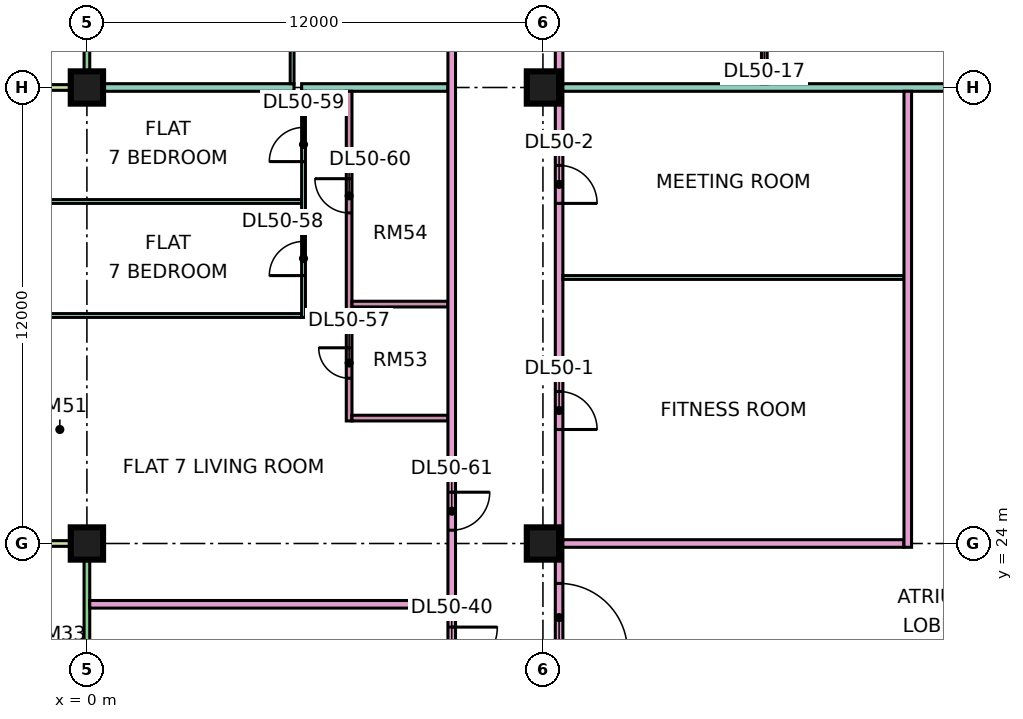
"""IFC4 building model, lengths in metres.
Left out: names, types, materials, properties, quantities, classifications, styles, units other than length and angle.
Written with IfcOpenShell. Run it as: python <this file> out.ifc"""

import sys

from ifc_helpers import new_model, si_unit, direction, frame, frame_2d, origin, origin_2d, place, context, subcontext, project, spatial, rectangle, extrude, element, fill, save


model = new_model("IFC4")
c1 = context("Model", 3, precision=1e-05, world=origin(), true_north=direction((0.0, 1.0)))
c2 = subcontext(c1, "Body", "Model", "MODEL_VIEW")
j1 = project(units=[si_unit("LENGTHUNIT", "METRE"), si_unit("PLANEANGLEUNIT", "RADIAN")], contexts=[c1])
p1 = place(None, origin())
s1 = spatial("IfcSite", under=j1, at=p1, CompositionType="ELEMENT")
p2 = place(p1, origin())
s2 = spatial("IfcBuilding", under=s1, at=p2, CompositionType="ELEMENT")
p3 = place(p2, frame((0.0, 0.0, 215.4)))
s3 = spatial("IfcBuildingStorey", under=s2, at=p3, CompositionType="ELEMENT", Elevation=215.4)
p4 = place(p3, frame((0.0, 24.0, 0.0), z_axis=(0.0, 0.0, 1.0), x_axis=(1.0, 0.0, 0.0)))
e1 = element("IfcColumn", 1, at=p4, inside=s3, PredefinedType="COLUMN", context=c2, shape_type="SweptSolid", body=[
    extrude(rectangle(XDim=0.85, YDim=0.85, at=origin_2d()), origin(), (0.0, 0.0, 1.0), 3.75),
])
p5 = place(p3, frame((0.0, 36.0, 0.0), z_axis=(0.0, 0.0, 1.0), x_axis=(1.0, 0.0, 0.0)))
e2 = element("IfcColumn", 2, at=p5, inside=s3, PredefinedType="COLUMN", context=c2, shape_type="SweptSolid", body=[
    extrude(rectangle(XDim=0.85, YDim=0.85, at=origin_2d()), origin(), (0.0, 0.0, 1.0), 3.75),
])
for number, where, z_axis, x_axis in (
    (3, (12.0, 24.0, 0.0), (0.0, 0.0, 1.0), (1.0, 0.0, 0.0)),
    (4, (12.0, 36.0, 0.0), (0.0, 0.0, 1.0), (1.0, 0.0, 0.0)),
):
    element("IfcColumn", number, at=place(p3, frame(where, z_axis=z_axis, x_axis=x_axis)), inside=s3, PredefinedType="COLUMN", context=c2, shape_type="SweptSolid", body=[
        extrude(rectangle(XDim=0.85, YDim=0.85, at=origin_2d()), origin(), (0.0, 0.0, 1.0), 3.75),
    ])
p6 = place(p3, frame((0.0, 47.925, 0.0), z_axis=(0.0, 0.0, 1.0), x_axis=(0.0, -1.0, 0.0)))
e5 = element("IfcWall", 5, at=p6, inside=s3, PredefinedType="SOLIDWALL", context=c2, shape_type="SweptSolid", body=[
    extrude(rectangle(XDim=11.85, YDim=0.15, at=frame_2d((5.925, 0.0))), origin(), (0.0, 0.0, 1.0), 3.35),
])
p7 = place(p6, frame((0.6, 0.0, 0.45)))
e6 = element("IfcOpeningElement", 6, at=p7, cuts=e5, PredefinedType="OPENING", context=c2, shape_type="SweptSolid", body=[
    extrude(rectangle(XDim=1.2, YDim=2.4, at=frame_2d((0.6, 1.2))), frame((0.0, 0.085, 0.0), z_axis=(0.0, -1.0, 0.0), x_axis=(1.0, 0.0, 0.0)), (0.0, 0.0, 1.0), 0.17),
])
p8 = place(p6, frame((4.087, 0.0, 0.0)))
e7 = element("IfcOpeningElement", 7, at=p8, cuts=e5, PredefinedType="OPENING", context=c2, shape_type="SweptSolid", body=[
    extrude(rectangle(XDim=1.2, YDim=2.4, at=frame_2d((0.6, 1.2))), frame((0.0, 0.085, 0.0), z_axis=(0.0, -1.0, 0.0), x_axis=(1.0, 0.0, 0.0)), (0.0, 0.0, 1.0), 0.17),
])
p9 = place(p6, frame((6.525, 0.0, 0.45)))
e8 = element("IfcOpeningElement", 8, at=p9, cuts=e5, PredefinedType="OPENING", context=c2, shape_type="SweptSolid", body=[
    extrude(rectangle(XDim=1.8, YDim=2.4, at=frame_2d((0.9, 1.2))), frame((0.0, 0.085, 0.0), z_axis=(0.0, -1.0, 0.0), x_axis=(1.0, 0.0, 0.0)), (0.0, 0.0, 1.0), 0.17),
])
p10 = place(p6, frame((9.562, 0.0, 0.45)))
e9 = element("IfcOpeningElement", 9, at=p10, cuts=e5, PredefinedType="OPENING", context=c2, shape_type="SweptSolid", body=[
    extrude(rectangle(XDim=1.2, YDim=2.4, at=frame_2d((0.6, 1.2))), frame((0.0, 0.085, 0.0), z_axis=(0.0, -1.0, 0.0), x_axis=(1.0, 0.0, 0.0)), (0.0, 0.0, 1.0), 0.17),
])
p11 = place(p3, frame((-1.5, 36.0, 0.0), z_axis=(0.0, 0.0, 1.0), x_axis=(1.0, 0.0, 0.0)))
e10 = element("IfcWall", 10, at=p11, inside=s3, PredefinedType="SOLIDWALL", context=c2, shape_type="SweptSolid", body=[
    extrude(rectangle(XDim=1.5, YDim=0.15, at=frame_2d((0.75, 0.0))), origin(), (0.0, 0.0, 1.0), 3.35),
])
p12 = place(p3, frame((0.0, 23.925, 0.0), z_axis=(0.0, 0.0, 1.0), x_axis=(0.0, -1.0, 0.0)))
e11 = element("IfcWall", 11, at=p12, inside=s3, PredefinedType="SOLIDWALL", context=c2, shape_type="SweptSolid", body=[
    extrude(rectangle(XDim=11.35, YDim=0.15, at=frame_2d((5.675, 0.0))), origin(), (0.0, 0.0, 1.0), 3.35),
])
p13 = place(p12, frame((6.738, 0.0, 0.0)))
e12 = element("IfcOpeningElement", 12, at=p13, cuts=e11, PredefinedType="OPENING", context=c2, shape_type="SweptSolid", body=[
    extrude(rectangle(XDim=1.8, YDim=2.4, at=frame_2d((0.9, 1.2))), frame((0.0, 0.085, 0.0), z_axis=(0.0, -1.0, 0.0), x_axis=(1.0, 0.0, 0.0)), (0.0, 0.0, 1.0), 0.17),
])
p14 = place(p3, frame((-1.5, 24.0, 0.0), z_axis=(0.0, 0.0, 1.0), x_axis=(1.0, 0.0, 0.0)))
e13 = element("IfcWall", 13, at=p14, inside=s3, PredefinedType="SOLIDWALL", context=c2, shape_type="SweptSolid", body=[
    extrude(rectangle(XDim=1.5, YDim=0.15, at=frame_2d((0.75, 0.0))), origin(), (0.0, 0.0, 1.0), 3.35),
])
p15 = place(p3, frame((-1.351, 33.0, 0.0), z_axis=(0.0, 0.0, 1.0), x_axis=(1.0, 0.0, 0.0)))
e14 = element("IfcWall", 14, at=p15, inside=s3, PredefinedType="PARTITIONING", context=c2, shape_type="SweptSolid", body=[
    extrude(rectangle(XDim=7.001, YDim=0.1, at=frame_2d((3.5, 0.0))), origin(), (0.0, 0.0, 1.0), 3.35),
])
p16 = place(p3, frame((-1.35, 30.0, 0.0), z_axis=(0.0, 0.0, 1.0), x_axis=(1.0, 0.0, 0.0)))
e15 = element("IfcWall", 15, at=p16, inside=s3, PredefinedType="PARTITIONING", context=c2, shape_type="SweptSolid", body=[
    extrude(rectangle(XDim=7.0, YDim=0.1, at=frame_2d((3.5, 0.0))), origin(), (0.0, 0.0, 1.0), 3.35),
])
e16 = element("IfcWall", 16, at=p5, inside=s3, PredefinedType="PARTITIONING", context=c2, shape_type="SweptSolid", body=[
    extrude(rectangle(XDim=5.45, YDim=0.2, at=frame_2d((2.725, 0.0))), origin(), (0.0, 0.0, 1.0), 3.35),
])
p17 = place(p3, frame((0.074, 22.4, 0.0), z_axis=(0.0, 0.0, 1.0), x_axis=(1.0, 0.0, 0.0)))
e17 = element("IfcWall", 17, at=p17, inside=s3, PredefinedType="PARTITIONING", context=c2, shape_type="SweptSolid", body=[
    extrude(rectangle(XDim=9.426, YDim=0.2, at=frame_2d((4.713, 0.0))), origin(), (0.0, 0.0, 1.0), 3.35),
])
p18 = place(p3, frame((5.4, 36.1, 0.0), z_axis=(0.0, 0.0, 1.0), x_axis=(0.0, 1.0, 0.0)))
e18 = element("IfcWall", 18, at=p18, inside=s3, PredefinedType="PARTITIONING", context=c2, shape_type="SweptSolid", body=[
    extrude(rectangle(XDim=26.95, YDim=0.1, at=frame_2d((13.475, 0.0))), origin(), (0.0, 0.0, 1.0), 3.35),
])
p19 = place(p18, frame((0.95, 0.0, 0.0)))
e19 = element("IfcOpeningElement", 19, at=p19, cuts=e18, PredefinedType="OPENING", context=c2, shape_type="SweptSolid", body=[
    extrude(rectangle(XDim=0.9, YDim=2.1, at=frame_2d((0.45, 1.05))), frame((0.0, 0.06, 0.0), z_axis=(0.0, -1.0, 0.0), x_axis=(1.0, 0.0, 0.0)), (0.0, 0.0, 1.0), 0.12),
])
p20 = place(p18, frame((3.95, 0.0, 0.0)))
e20 = element("IfcOpeningElement", 20, at=p20, cuts=e18, PredefinedType="OPENING", context=c2, shape_type="SweptSolid", body=[
    extrude(rectangle(XDim=0.9, YDim=2.1, at=frame_2d((0.45, 1.05))), frame((0.0, 0.06, 0.0), z_axis=(0.0, -1.0, 0.0), x_axis=(1.0, 0.0, 0.0)), (0.0, 0.0, 1.0), 0.12),
])
p21 = place(p18, frame((15.95, 0.0, 0.0)))
e21 = element("IfcOpeningElement", 21, at=p21, cuts=e18, PredefinedType="OPENING", context=c2, shape_type="SweptSolid", body=[
    extrude(rectangle(XDim=0.9, YDim=2.1, at=frame_2d((0.45, 1.05))), frame((0.0, 0.06, 0.0), z_axis=(0.0, -1.0, 0.0), x_axis=(1.0, 0.0, 0.0)), (0.0, 0.0, 1.0), 0.12),
])
p22 = place(p18, frame((18.95, 0.0, 0.0)))
e22 = element("IfcOpeningElement", 22, at=p22, cuts=e18, PredefinedType="OPENING", context=c2, shape_type="SweptSolid", body=[
    extrude(rectangle(XDim=0.9, YDim=2.1, at=frame_2d((0.45, 1.05))), frame((0.0, 0.06, 0.0), z_axis=(0.0, -1.0, 0.0), x_axis=(1.0, 0.0, 0.0)), (0.0, 0.0, 1.0), 0.12),
])
p23 = place(p18, frame((21.95, 0.0, 0.0)))
e23 = element("IfcOpeningElement", 23, at=p23, cuts=e18, PredefinedType="OPENING", context=c2, shape_type="SweptSolid", body=[
    extrude(rectangle(XDim=0.9, YDim=2.1, at=frame_2d((0.45, 1.05))), frame((0.0, 0.06, 0.0), z_axis=(0.0, -1.0, 0.0), x_axis=(1.0, 0.0, 0.0)), (0.0, 0.0, 1.0), 0.12),
])
p24 = place(p18, frame((9.95, 0.0, 0.0)))
e24 = element("IfcOpeningElement", 24, at=p24, cuts=e18, PredefinedType="OPENING", context=c2, shape_type="SweptSolid", body=[
    extrude(rectangle(XDim=0.9, YDim=2.1, at=frame_2d((0.45, 1.05))), frame((0.0, 0.06, 0.0), z_axis=(0.0, -1.0, 0.0), x_axis=(1.0, 0.0, 0.0)), (0.0, 0.0, 1.0), 0.12),
])
p25 = place(p18, frame((24.55, 0.0, 0.0)))
e25 = element("IfcOpeningElement", 25, at=p25, cuts=e18, PredefinedType="OPENING", context=c2, shape_type="SweptSolid", body=[
    extrude(rectangle(XDim=1.6, YDim=2.1, at=frame_2d((0.8, 1.05))), frame((0.0, 0.06, 0.0), z_axis=(0.0, -1.0, 0.0), x_axis=(1.0, 0.0, 0.0)), (0.0, 0.0, 1.0), 0.12),
])
p26 = place(p3, frame((5.65, 36.0, 0.0), z_axis=(0.0, 0.0, 1.0), x_axis=(1.0, 0.0, 0.0)))
e26 = element("IfcWall", 26, at=p26, inside=s3, PredefinedType="PARTITIONING", context=c2, shape_type="SweptSolid", body=[
    extrude(rectangle(XDim=3.85, YDim=0.2, at=frame_2d((1.925, 0.0))), origin(), (0.0, 0.0, 1.0), 3.35),
])
p27 = place(p3, frame((5.7, 29.95, 0.0), z_axis=(0.0, 0.0, 1.0), x_axis=(0.0, 1.0, 0.0)))
e27 = element("IfcWall", 27, at=p27, inside=s3, PredefinedType="PARTITIONING", context=c2, shape_type="SweptSolid", body=[
    extrude(rectangle(XDim=5.95, YDim=0.1, at=frame_2d((2.975, 0.0))), origin(), (0.0, 0.0, 1.0), 3.35),
])
p28 = place(p27, frame((1.1, 0.0, 0.0)))
e28 = element("IfcOpeningElement", 28, at=p28, cuts=e27, PredefinedType="OPENING", context=c2, shape_type="SweptSolid", body=[
    extrude(rectangle(XDim=0.9, YDim=2.1, at=frame_2d((0.45, 1.05))), frame((0.0, 0.06, 0.0), z_axis=(0.0, -1.0, 0.0), x_axis=(1.0, 0.0, 0.0)), (0.0, 0.0, 1.0), 0.12),
])
p29 = place(p27, frame((4.1, 0.0, 0.0)))
e29 = element("IfcOpeningElement", 29, at=p29, cuts=e27, PredefinedType="OPENING", context=c2, shape_type="SweptSolid", body=[
    extrude(rectangle(XDim=0.9, YDim=2.1, at=frame_2d((0.45, 1.05))), frame((0.0, 0.06, 0.0), z_axis=(0.0, -1.0, 0.0), x_axis=(1.0, 0.0, 0.0)), (0.0, 0.0, 1.0), 0.12),
])
p30 = place(p3, frame((6.9, 27.225, 0.0), z_axis=(0.0, 0.0, 1.0), x_axis=(0.0, 1.0, 0.0)))
e30 = element("IfcWall", 30, at=p30, inside=s3, PredefinedType="PARTITIONING", context=c2, shape_type="SweptSolid", body=[
    extrude(rectangle(XDim=8.675, YDim=0.15, at=frame_2d((4.337, 0.0))), origin(), (0.0, 0.0, 1.0), 3.35),
])
p31 = place(p30, frame((1.125, 0.0, 0.0)))
e31 = element("IfcOpeningElement", 31, at=p31, cuts=e30, PredefinedType="OPENING", context=c2, shape_type="SweptSolid", body=[
    extrude(rectangle(XDim=0.8, YDim=2.1, at=frame_2d((0.4, 1.05))), frame((0.0, 0.085, 0.0), z_axis=(0.0, -1.0, 0.0), x_axis=(1.0, 0.0, 0.0)), (0.0, 0.0, 1.0), 0.17),
])
p32 = place(p30, frame((5.475, 0.0, 0.0)))
e32 = element("IfcOpeningElement", 32, at=p32, cuts=e30, PredefinedType="OPENING", context=c2, shape_type="SweptSolid", body=[
    extrude(rectangle(XDim=0.9, YDim=2.1, at=frame_2d((0.45, 1.05))), frame((0.0, 0.085, 0.0), z_axis=(0.0, -1.0, 0.0), x_axis=(1.0, 0.0, 0.0)), (0.0, 0.0, 1.0), 0.17),
])
for number, where, z_axis, x_axis in (
    (33, (6.975, 27.3, 0.0), (0.0, 0.0, 1.0), (1.0, 0.0, 0.0)),
    (34, (6.975, 30.3, 0.0), (0.0, 0.0, 1.0), (1.0, 0.0, 0.0)),
):
    element("IfcWall", number, at=place(p3, frame(where, z_axis=z_axis, x_axis=x_axis)), inside=s3, PredefinedType="PARTITIONING", context=c2, shape_type="SweptSolid", body=[
        extrude(rectangle(XDim=2.525, YDim=0.15, at=frame_2d((1.262, 0.0))), origin(), (0.0, 0.0, 1.0), 3.35),
    ])
p33 = place(p3, frame((9.6, 20.0, 0.0), z_axis=(0.0, 0.0, 1.0), x_axis=(0.0, 1.0, 0.0)))
e35 = element("IfcWall", 35, at=p33, inside=s3, PredefinedType="PARTITIONING", context=c2, shape_type="SweptSolid", body=[
    extrude(rectangle(XDim=44.35, YDim=0.2, at=frame_2d((22.175, 0.0))), origin(), (0.0, 0.0, 1.0), 3.35),
])
p34 = place(p33, frame((17.25, 0.0, 0.0)))
e36 = element("IfcOpeningElement", 36, at=p34, cuts=e35, PredefinedType="OPENING", context=c2, shape_type="SweptSolid", body=[
    extrude(rectangle(XDim=1.0, YDim=2.1, at=frame_2d((0.5, 1.05))), frame((0.0, 0.11, 0.0), z_axis=(0.0, -1.0, 0.0), x_axis=(1.0, 0.0, 0.0)), (0.0, 0.0, 1.0), 0.22),
])
p35 = place(p33, frame((0.6, 0.0, 0.0)))
e37 = element("IfcOpeningElement", 37, at=p35, cuts=e35, PredefinedType="OPENING", context=c2, shape_type="SweptSolid", body=[
    extrude(rectangle(XDim=1.2, YDim=2.1, at=frame_2d((0.6, 1.05))), frame((0.0, 0.11, 0.0), z_axis=(0.0, -1.0, 0.0), x_axis=(1.0, 0.0, 0.0)), (0.0, 0.0, 1.0), 0.22),
])
p36 = place(p33, frame((4.35, 0.0, 0.0)))
e38 = element("IfcOpeningElement", 38, at=p36, cuts=e35, PredefinedType="OPENING", context=c2, shape_type="SweptSolid", body=[
    extrude(rectangle(XDim=1.0, YDim=2.1, at=frame_2d((0.5, 1.05))), frame((0.0, 0.11, 0.0), z_axis=(0.0, -1.0, 0.0), x_axis=(1.0, 0.0, 0.0)), (0.0, 0.0, 1.0), 0.22),
])
p37 = place(p3, frame((12.425, 20.0, 0.0), z_axis=(0.0, 0.0, 1.0), x_axis=(0.0, 1.0, 0.0)))
e39 = element("IfcWall", 39, at=p37, inside=s3, PredefinedType="PARTITIONING", context=c2, shape_type="SweptSolid", body=[
    extrude(rectangle(XDim=42.926, YDim=0.2, at=frame_2d((21.463, 0.0))), origin(), (0.0, 0.0, 1.0), 3.35),
])
p38 = place(p37, frame((7.0, 0.0, 0.0)))
e40 = element("IfcOpeningElement", 40, at=p38, cuts=e39, PredefinedType="OPENING", context=c2, shape_type="SweptSolid", body=[
    extrude(rectangle(XDim=1.0, YDim=2.1, at=frame_2d((0.5, 1.05))), frame((0.0, 0.11, 0.0), z_axis=(0.0, -1.0, 0.0), x_axis=(1.0, 0.0, 0.0)), (0.0, 0.0, 1.0), 0.22),
])
p39 = place(p37, frame((12.95, 0.0, 0.0)))
e41 = element("IfcOpeningElement", 41, at=p39, cuts=e39, PredefinedType="OPENING", context=c2, shape_type="SweptSolid", body=[
    extrude(rectangle(XDim=1.0, YDim=2.1, at=frame_2d((0.5, 1.05))), frame((0.0, 0.11, 0.0), z_axis=(0.0, -1.0, 0.0), x_axis=(1.0, 0.0, 0.0)), (0.0, 0.0, 1.0), 0.22),
])
p40 = place(p37, frame((23.35, 0.0, 0.0)))
e42 = element("IfcOpeningElement", 42, at=p40, cuts=e39, PredefinedType="OPENING", context=c2, shape_type="SweptSolid", body=[
    extrude(rectangle(XDim=1.0, YDim=2.1, at=frame_2d((0.5, 1.05))), frame((0.0, 0.11, 0.0), z_axis=(0.0, -1.0, 0.0), x_axis=(1.0, 0.0, 0.0)), (0.0, 0.0, 1.0), 0.22),
])
p41 = place(p37, frame((35.2, 0.0, 0.0)))
e43 = element("IfcOpeningElement", 43, at=p41, cuts=e39, PredefinedType="OPENING", context=c2, shape_type="SweptSolid", body=[
    extrude(rectangle(XDim=1.0, YDim=2.1, at=frame_2d((0.5, 1.05))), frame((0.0, 0.11, 0.0), z_axis=(0.0, -1.0, 0.0), x_axis=(1.0, 0.0, 0.0)), (0.0, 0.0, 1.0), 0.22),
])
p42 = place(p37, frame((1.15, 0.0, 0.0)))
e44 = element("IfcOpeningElement", 44, at=p42, cuts=e39, PredefinedType="OPENING", context=c2, shape_type="SweptSolid", body=[
    extrude(rectangle(XDim=1.8, YDim=2.1, at=frame_2d((0.9, 1.05))), frame((0.0, 0.11, 0.0), z_axis=(0.0, -1.0, 0.0), x_axis=(1.0, 0.0, 0.0)), (0.0, 0.0, 1.0), 0.22),
])
p43 = place(p37, frame((28.6, 0.0, 0.0)))
e45 = element("IfcOpeningElement", 45, at=p43, cuts=e39, PredefinedType="OPENING", context=c2, shape_type="SweptSolid", body=[
    extrude(rectangle(XDim=1.8, YDim=2.1, at=frame_2d((0.9, 1.05))), frame((0.0, 0.11, 0.0), z_axis=(0.0, -1.0, 0.0), x_axis=(1.0, 0.0, 0.0)), (0.0, 0.0, 1.0), 0.22),
])
p44 = place(p3, frame((12.525, 24.0, 0.0), z_axis=(0.0, 0.0, 1.0), x_axis=(1.0, 0.0, 0.0)))
e46 = element("IfcWall", 46, at=p44, inside=s3, PredefinedType="PARTITIONING", context=c2, shape_type="SweptSolid", body=[
    extrude(rectangle(XDim=8.975, YDim=0.2, at=frame_2d((4.488, 0.0))), origin(), (0.0, 0.0, 1.0), 3.35),
])
p45 = place(p3, frame((12.525, 31.0, 0.0), z_axis=(0.0, 0.0, 1.0), x_axis=(1.0, 0.0, 0.0)))
e47 = element("IfcWall", 47, at=p45, inside=s3, PredefinedType="PARTITIONING", context=c2, shape_type="SweptSolid", body=[
    extrude(rectangle(XDim=8.975, YDim=0.1, at=frame_2d((4.488, 0.0))), origin(), (0.0, 0.0, 1.0), 3.35),
])
p46 = place(p3, frame((12.525, 36.0, 0.0), z_axis=(0.0, 0.0, 1.0), x_axis=(1.0, 0.0, 0.0)))
e48 = element("IfcWall", 48, at=p46, inside=s3, PredefinedType="PARTITIONING", context=c2, shape_type="SweptSolid", body=[
    extrude(rectangle(XDim=11.475, YDim=0.2, at=frame_2d((5.738, 0.0))), origin(), (0.0, 0.0, 1.0), 3.35),
])
p47 = place(p3, frame((17.825, 36.1, 0.0), z_axis=(0.0, 0.0, 1.0), x_axis=(0.0, 1.0, 0.0)))
e49 = element("IfcWall", 49, at=p47, inside=s3, PredefinedType="PARTITIONING", context=c2, shape_type="SweptSolid", body=[
    extrude(rectangle(XDim=6.575, YDim=0.15, at=frame_2d((3.288, 0.0))), origin(), (0.0, 0.0, 1.0), 3.35),
])
p48 = place(p47, frame((4.35, 0.0, 0.0)))
e50 = element("IfcOpeningElement", 50, at=p48, cuts=e49, PredefinedType="OPENING", context=c2, shape_type="SweptSolid", body=[
    extrude(rectangle(XDim=0.8, YDim=2.1, at=frame_2d((0.4, 1.05))), frame((0.0, 0.085, 0.0), z_axis=(0.0, -1.0, 0.0), x_axis=(1.0, 0.0, 0.0)), (0.0, 0.0, 1.0), 0.17),
])
p49 = place(p47, frame((0.95, 0.0, 0.0)))
e51 = element("IfcOpeningElement", 51, at=p49, cuts=e49, PredefinedType="OPENING", context=c2, shape_type="SweptSolid", body=[
    extrude(rectangle(XDim=0.9, YDim=2.1, at=frame_2d((0.45, 1.05))), frame((0.0, 0.085, 0.0), z_axis=(0.0, -1.0, 0.0), x_axis=(1.0, 0.0, 0.0)), (0.0, 0.0, 1.0), 0.17),
])
p50 = place(p3, frame((21.6, 23.9, 0.0), z_axis=(0.0, 0.0, 1.0), x_axis=(0.0, 1.0, 0.0)))
e52 = element("IfcWall", 52, at=p50, inside=s3, PredefinedType="PARTITIONING", context=c2, shape_type="SweptSolid", body=[
    extrude(rectangle(XDim=12.0, YDim=0.2, at=frame_2d((6.0, 0.0))), origin(), (0.0, 0.0, 1.0), 3.35),
])
p51 = place(p38, frame((1.0, 0.0, 0.0), z_axis=(0.0, 0.0, 1.0), x_axis=(-1.0, 0.0, 0.0)))
e53 = element("IfcDoor", 53, at=p51, inside=s3, OperationType="SINGLE_SWING_LEFT", PredefinedType="DOOR", context=c2, shape_type="SweptSolid", body=[
    extrude(rectangle(XDim=1.0, YDim=2.1, at=frame_2d((0.5, 1.05))), frame((0.0, 0.025, 0.0), z_axis=(0.0, -1.0, 0.0), x_axis=(1.0, 0.0, 0.0)), (0.0, 0.0, 1.0), 0.05),
])
fill(e40, e53)
p52 = place(p39, frame((1.0, 0.0, 0.0), z_axis=(0.0, 0.0, 1.0), x_axis=(-1.0, 0.0, 0.0)))
e54 = element("IfcDoor", 54, at=p52, inside=s3, OperationType="SINGLE_SWING_LEFT", PredefinedType="DOOR", context=c2, shape_type="SweptSolid", body=[
    extrude(rectangle(XDim=1.0, YDim=2.1, at=frame_2d((0.5, 1.05))), frame((0.0, 0.025, 0.0), z_axis=(0.0, -1.0, 0.0), x_axis=(1.0, 0.0, 0.0)), (0.0, 0.0, 1.0), 0.05),
])
fill(e41, e54)
p53 = place(p42, frame((1.8, 0.0, 0.0), z_axis=(0.0, 0.0, 1.0), x_axis=(-1.0, 0.0, 0.0)))
e55 = element("IfcDoor", 55, at=p53, inside=s3, OperationType="DOUBLE_DOOR_SINGLE_SWING", PredefinedType="DOOR", context=c2, shape_type="SweptSolid", body=[
    extrude(rectangle(XDim=1.8, YDim=2.1, at=frame_2d((0.9, 1.05))), frame((0.0, 0.025, 0.0), z_axis=(0.0, -1.0, 0.0), x_axis=(1.0, 0.0, 0.0)), (0.0, 0.0, 1.0), 0.05),
])
fill(e44, e55)
p54 = place(p35, origin())
e56 = element("IfcDoor", 56, at=p54, inside=s3, OperationType="SINGLE_SWING_RIGHT", PredefinedType="DOOR", context=c2, shape_type="SweptSolid", body=[
    extrude(rectangle(XDim=1.2, YDim=2.1, at=frame_2d((0.6, 1.05))), frame((0.0, 0.025, 0.0), z_axis=(0.0, -1.0, 0.0), x_axis=(1.0, 0.0, 0.0)), (0.0, 0.0, 1.0), 0.05),
])
fill(e37, e56)
p55 = place(p31, frame((0.8, 0.0, 0.0), z_axis=(0.0, 0.0, 1.0), x_axis=(-1.0, 0.0, 0.0)))
e57 = element("IfcDoor", 57, at=p55, inside=s3, OperationType="SINGLE_SWING_RIGHT", PredefinedType="DOOR", context=c2, shape_type="SweptSolid", body=[
    extrude(rectangle(XDim=0.8, YDim=2.1, at=frame_2d((0.4, 1.05))), frame((0.0, 0.025, 0.0), z_axis=(0.0, -1.0, 0.0), x_axis=(1.0, 0.0, 0.0)), (0.0, 0.0, 1.0), 0.05),
])
fill(e31, e57)
p56 = place(p28, origin())
e58 = element("IfcDoor", 58, at=p56, inside=s3, OperationType="SINGLE_SWING_LEFT", PredefinedType="DOOR", context=c2, shape_type="SweptSolid", body=[
    extrude(rectangle(XDim=0.9, YDim=2.1, at=frame_2d((0.45, 1.05))), frame((0.0, 0.025, 0.0), z_axis=(0.0, -1.0, 0.0), x_axis=(1.0, 0.0, 0.0)), (0.0, 0.0, 1.0), 0.05),
])
fill(e28, e58)
p57 = place(p29, origin())
e59 = element("IfcDoor", 59, at=p57, inside=s3, OperationType="SINGLE_SWING_LEFT", PredefinedType="DOOR", context=c2, shape_type="SweptSolid", body=[
    extrude(rectangle(XDim=0.9, YDim=2.1, at=frame_2d((0.45, 1.05))), frame((0.0, 0.025, 0.0), z_axis=(0.0, -1.0, 0.0), x_axis=(1.0, 0.0, 0.0)), (0.0, 0.0, 1.0), 0.05),
])
fill(e29, e59)
p58 = place(p32, frame((0.9, 0.0, 0.0), z_axis=(0.0, 0.0, 1.0), x_axis=(-1.0, 0.0, 0.0)))
e60 = element("IfcDoor", 60, at=p58, inside=s3, OperationType="SINGLE_SWING_RIGHT", PredefinedType="DOOR", context=c2, shape_type="SweptSolid", body=[
    extrude(rectangle(XDim=0.9, YDim=2.1, at=frame_2d((0.45, 1.05))), frame((0.0, 0.025, 0.0), z_axis=(0.0, -1.0, 0.0), x_axis=(1.0, 0.0, 0.0)), (0.0, 0.0, 1.0), 0.05),
])
fill(e32, e60)
p59 = place(p36, origin())
e61 = element("IfcDoor", 61, at=p59, inside=s3, OperationType="SINGLE_SWING_RIGHT", PredefinedType="DOOR", context=c2, shape_type="SweptSolid", body=[
    extrude(rectangle(XDim=1.0, YDim=2.1, at=frame_2d((0.5, 1.05))), frame((0.0, 0.025, 0.0), z_axis=(0.0, -1.0, 0.0), x_axis=(1.0, 0.0, 0.0)), (0.0, 0.0, 1.0), 0.05),
])
fill(e38, e61)
save(model, sys.argv[1])
